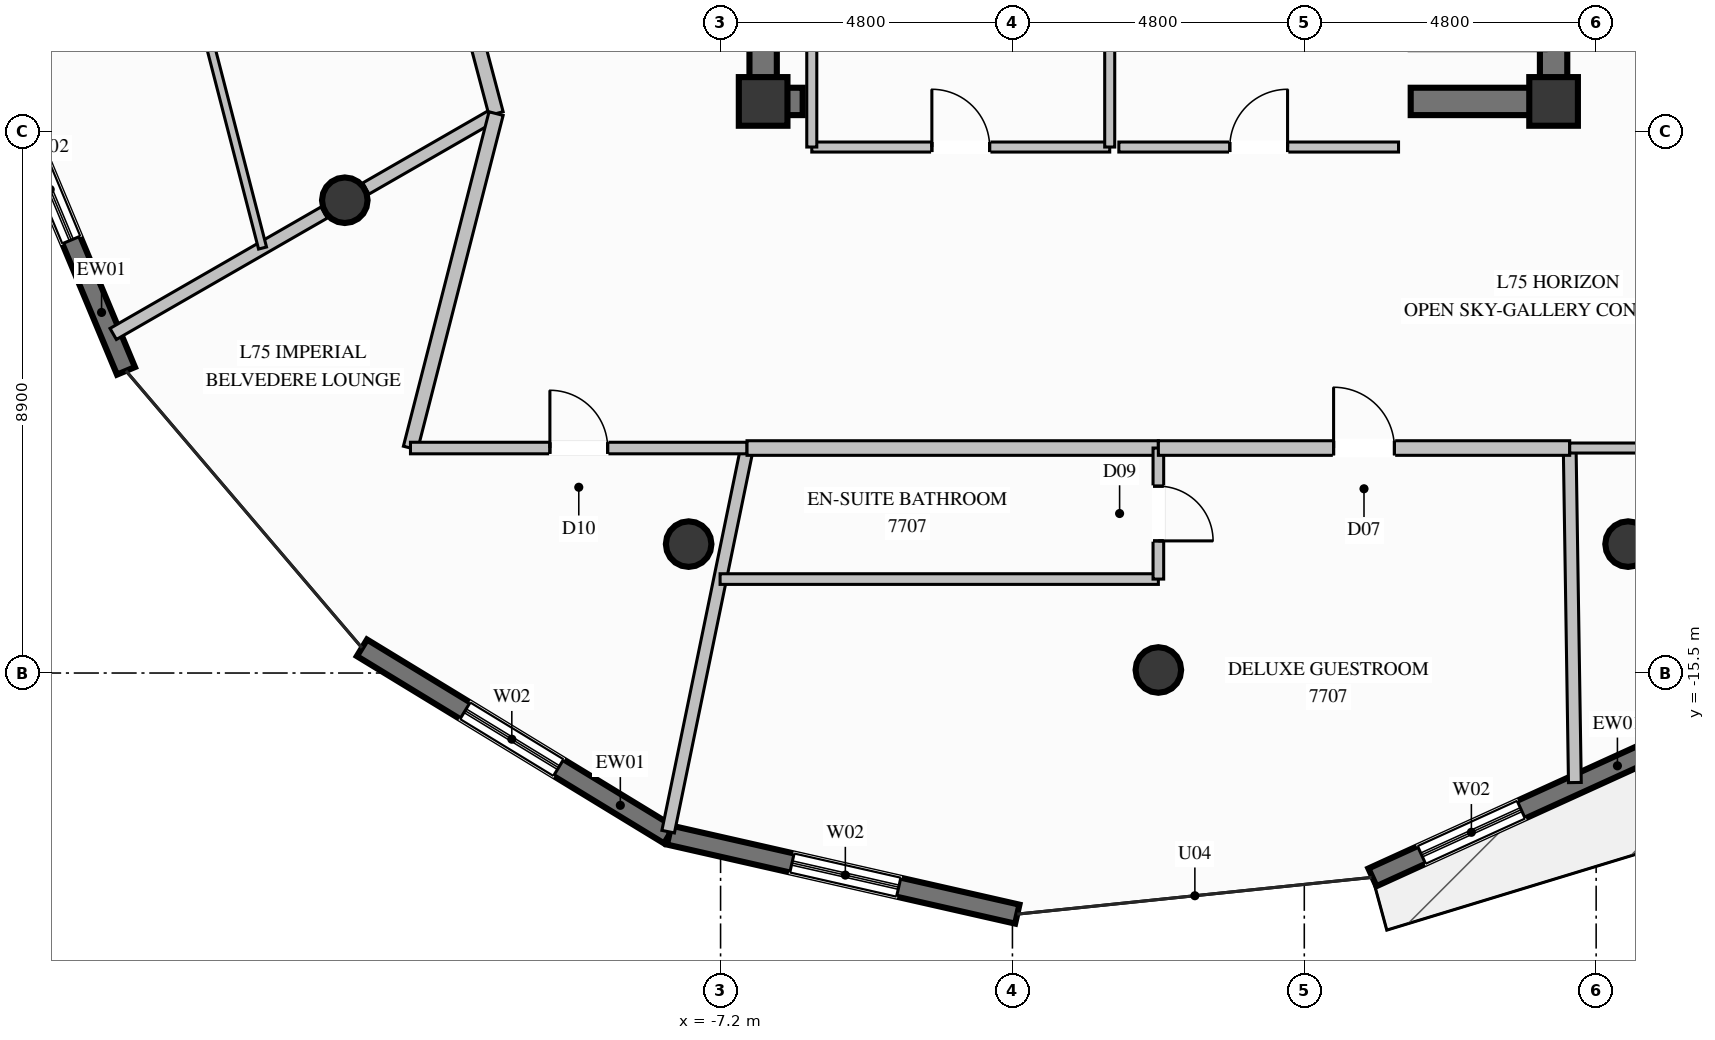
"""IFC4 building model, lengths in metres.
Left out: names, types, materials, properties, quantities, classifications, styles, units other than length and angle.
Written with IfcOpenShell. Run it as: python <this file> out.ifc"""

import sys

from ifc_helpers import new_model, si_unit, direction, frame, frame_2d, origin, origin_2d, place, context, subcontext, project, spatial, rectangle, circle, extrude, element, fill, save


model = new_model("IFC4")
c1 = context("Model", 3, precision=1e-05, world=origin(), true_north=direction((0.0, 1.0)))
c2 = subcontext(c1, "Body", "Model", "MODEL_VIEW")
j1 = project(units=[si_unit("LENGTHUNIT", "METRE"), si_unit("PLANEANGLEUNIT", "RADIAN")], contexts=[c1])
p1 = place(None, origin())
s1 = spatial("IfcSite", under=j1, at=p1, CompositionType="ELEMENT")
p2 = place(p1, origin())
s2 = spatial("IfcBuilding", under=s1, at=p2, CompositionType="ELEMENT")
p3 = place(p2, frame((0.0, 0.0, 289.6)))
s3 = spatial("IfcBuildingStorey", under=s2, at=p3, CompositionType="ELEMENT", Elevation=289.6)
for number, where, z_axis, x_axis in (
    (1, (-6.5, -6.1, 0.0), (0.0, 0.0, 1.0), (1.0, 0.0, 0.0)),
    (2, (6.5, -6.1, 0.0), (0.0, 0.0, 1.0), (1.0, 0.0, 0.0)),
):
    element("IfcColumn", number, at=place(p3, frame(where, z_axis=z_axis, x_axis=x_axis)), inside=s3, PredefinedType="COLUMN", context=c2, shape_type="SweptSolid", body=[
        extrude(rectangle(XDim=0.8, YDim=0.8, at=origin_2d()), origin(), (0.0, 0.0, 1.0), 3.8),
    ])
p4 = place(p3, frame((-6.275, -6.1, 0.0), z_axis=(0.0, 0.0, 1.0), x_axis=(1.0, 0.0, 0.0)))
e3 = element("IfcWall", 3, at=p4, inside=s3, PredefinedType="SHEAR", context=c2, shape_type="SweptSolid", body=[
    extrude(rectangle(XDim=0.425, YDim=0.45, at=frame_2d((0.212, 0.0))), origin(), (0.0, 0.0, 1.0), 3.8),
])
p5 = place(p3, frame((4.15, -6.1, 0.0), z_axis=(0.0, 0.0, 1.0), x_axis=(1.0, 0.0, 0.0)))
e4 = element("IfcWall", 4, at=p5, inside=s3, PredefinedType="SHEAR", context=c2, shape_type="SweptSolid", body=[
    extrude(rectangle(XDim=2.125, YDim=0.45, at=frame_2d((1.062, 0.0))), origin(), (0.0, 0.0, 1.0), 3.8),
])
p6 = place(p3, frame((-6.5, -6.325, 0.0), z_axis=(0.0, 0.0, 1.0), x_axis=(0.0, 1.0, 0.0)))
e5 = element("IfcWall", 5, at=p6, inside=s3, PredefinedType="SHEAR", context=c2, shape_type="SweptSolid", body=[
    extrude(rectangle(XDim=2.975, YDim=0.45, at=frame_2d((1.487, 0.0))), origin(), (0.0, 0.0, 1.0), 3.8),
])
p7 = place(p3, frame((6.5, -6.325, 0.0), z_axis=(0.0, 0.0, 1.0), x_axis=(0.0, 1.0, 0.0)))
e6 = element("IfcWall", 6, at=p7, inside=s3, PredefinedType="SHEAR", context=c2, shape_type="SweptSolid", body=[
    extrude(rectangle(XDim=3.975, YDim=0.45, at=frame_2d((1.987, 0.0))), origin(), (0.0, 0.0, 1.0), 3.8),
])
for number, where, z_axis, x_axis in (
    (7, (-13.38, -7.725, 0.0), (0.0, 0.0, 1.0), (1.0, 0.0, 0.0)),
    (8, (-7.725, -13.38, 0.0), (0.0, 0.0, 1.0), (1.0, 0.0, 0.0)),
    (9, (0.0, -15.45, 0.0), (0.0, 0.0, 1.0), (1.0, 0.0, 0.0)),
    (10, (7.725, -13.38, 0.0), (0.0, 0.0, 1.0), (1.0, 0.0, 0.0)),
):
    element("IfcColumn", number, at=place(p3, frame(where, z_axis=z_axis, x_axis=x_axis)), inside=s3, PredefinedType="COLUMN", context=c2, shape_type="SweptSolid", body=[
        extrude(circle(Radius=0.375, at=origin_2d()), origin(), (0.0, 0.0, 1.0), 3.8),
    ])
p8 = place(p3, frame((8.905, -16.409, 0.0), z_axis=(0.0, 0.0, 1.0), x_axis=(-0.910118979779, -0.414347007526, 0.0)))
e11 = element("IfcWall", 11, at=p8, inside=s3, PredefinedType="SOLIDWALL", context=c2, shape_type="SweptSolid", body=[
    extrude(rectangle(XDim=5.916, YDim=0.32, at=frame_2d((2.958, 0.0))), origin(), (0.0, 0.0, 1.0), 3.57),
])
p9 = place(p8, frame((3.228, 0.0, 0.35)))
e12 = element("IfcOpeningElement", 12, at=p9, cuts=e11, PredefinedType="OPENING", context=c2, shape_type="SweptSolid", body=[
    extrude(rectangle(XDim=1.8, YDim=2.6, at=frame_2d((0.9, 1.3))), frame((0.0, 0.17, 0.0), z_axis=(0.0, -1.0, 0.0), x_axis=(1.0, 0.0, 0.0)), (0.0, 0.0, 1.0), 0.34),
])
p10 = place(p3, frame((-16.979, -10.531, 0.0), z_axis=(0.0, 0.0, 1.0), x_axis=(-0.385394166941, 0.922752044749, 0.0)))
e13 = element("IfcWall", 13, at=p10, inside=s3, PredefinedType="SOLIDWALL", context=c2, shape_type="SweptSolid", body=[
    extrude(rectangle(XDim=6.053, YDim=0.32, at=frame_2d((3.027, 0.0))), origin(), (0.0, 0.0, 1.0), 3.57),
])
p11 = place(p10, frame((2.333, 0.0, 0.35)))
e14 = element("IfcOpeningElement", 14, at=p11, cuts=e13, PredefinedType="OPENING", context=c2, shape_type="SweptSolid", body=[
    extrude(rectangle(XDim=1.8, YDim=2.6, at=frame_2d((0.9, 1.3))), frame((0.0, 0.17, 0.0), z_axis=(0.0, -1.0, 0.0), x_axis=(1.0, 0.0, 0.0)), (0.0, 0.0, 1.0), 0.34),
])
p12 = place(p3, frame((-8.046, -18.165, 0.0), z_axis=(0.0, 0.0, 1.0), x_axis=(-0.853900395315, 0.520436465748, 0.0)))
e15 = element("IfcWall", 15, at=p12, inside=s3, PredefinedType="SOLIDWALL", context=c2, shape_type="SweptSolid", body=[
    extrude(rectangle(XDim=5.917, YDim=0.32, at=frame_2d((2.958, 0.0))), origin(), (0.0, 0.0, 1.0), 3.57),
])
p13 = place(p12, frame((2.13, 0.0, 0.35)))
e16 = element("IfcOpeningElement", 16, at=p13, cuts=e15, PredefinedType="OPENING", context=c2, shape_type="SweptSolid", body=[
    extrude(rectangle(XDim=1.8, YDim=2.6, at=frame_2d((0.9, 1.3))), frame((0.0, 0.17, 0.0), z_axis=(0.0, -1.0, 0.0), x_axis=(1.0, 0.0, 0.0)), (0.0, 0.0, 1.0), 0.34),
])
p14 = place(p3, frame((-2.32, -19.465, 0.0), z_axis=(0.0, 0.0, 1.0), x_axis=(-0.975179805598, 0.221414423093, 0.0)))
e17 = element("IfcWall", 17, at=p14, inside=s3, PredefinedType="SOLIDWALL", context=c2, shape_type="SweptSolid", body=[
    extrude(rectangle(XDim=5.872, YDim=0.32, at=frame_2d((2.936, 0.0))), origin(), (0.0, 0.0, 1.0), 3.57),
])
p15 = place(p14, frame((2.0, 0.0, 0.35)))
e18 = element("IfcOpeningElement", 18, at=p15, cuts=e17, PredefinedType="OPENING", context=c2, shape_type="SweptSolid", body=[
    extrude(rectangle(XDim=1.8, YDim=2.6, at=frame_2d((0.9, 1.3))), frame((0.0, 0.17, 0.0), z_axis=(0.0, -1.0, 0.0), x_axis=(1.0, 0.0, 0.0)), (0.0, 0.0, 1.0), 0.34),
])
p16 = place(p3, frame((-5.7, -6.85, 0.0), z_axis=(0.0, 0.0, 1.0), x_axis=(1.0, 0.0, 0.0)))
e19 = element("IfcWall", 19, at=p16, inside=s3, PredefinedType="PARTITIONING", context=c2, shape_type="SweptSolid", body=[
    extrude(rectangle(XDim=4.9, YDim=0.165, at=frame_2d((2.45, 0.0))), origin(), (0.0, 0.0, 1.0), 2.655),
])
p17 = place(p16, frame((1.975, 0.0, 0.0)))
e20 = element("IfcOpeningElement", 20, at=p17, cuts=e19, PredefinedType="OPENING", context=c2, shape_type="SweptSolid", body=[
    extrude(rectangle(XDim=0.95, YDim=2.1, at=frame_2d((0.475, 1.05))), frame((0.0, 0.093, 0.0), z_axis=(0.0, -1.0, 0.0), x_axis=(1.0, 0.0, 0.0)), (0.0, 0.0, 1.0), 0.185),
])
p18 = place(p3, frame((-0.8, -6.85, 0.0), z_axis=(0.0, 0.0, 1.0), x_axis=(0.0, 1.0, 0.0)))
e21 = element("IfcWall", 21, at=p18, inside=s3, PredefinedType="PARTITIONING", context=c2, shape_type="SweptSolid", body=[
    extrude(rectangle(XDim=3.35, YDim=0.165, at=frame_2d((1.675, 0.0))), origin(), (0.0, 0.0, 1.0), 3.57),
])
p19 = place(p3, frame((-5.7, -3.5, 0.0), z_axis=(0.0, 0.0, 1.0), x_axis=(0.0, -1.0, 0.0)))
e22 = element("IfcWall", 22, at=p19, inside=s3, PredefinedType="PARTITIONING", context=c2, shape_type="SweptSolid", body=[
    extrude(rectangle(XDim=3.35, YDim=0.165, at=frame_2d((1.675, 0.0))), origin(), (0.0, 0.0, 1.0), 2.655),
])
p20 = place(p3, frame((-0.65, -6.85, 0.0), z_axis=(0.0, 0.0, 1.0), x_axis=(1.0, 0.0, 0.0)))
e23 = element("IfcWall", 23, at=p20, inside=s3, PredefinedType="PARTITIONING", context=c2, shape_type="SweptSolid", body=[
    extrude(rectangle(XDim=4.6, YDim=0.165, at=frame_2d((2.3, 0.0))), origin(), (0.0, 0.0, 1.0), 2.655),
])
p21 = place(p20, frame((1.825, 0.0, 0.0)))
e24 = element("IfcOpeningElement", 24, at=p21, cuts=e23, PredefinedType="OPENING", context=c2, shape_type="SweptSolid", body=[
    extrude(rectangle(XDim=0.95, YDim=2.1, at=frame_2d((0.475, 1.05))), frame((0.0, 0.093, 0.0), z_axis=(0.0, -1.0, 0.0), x_axis=(1.0, 0.0, 0.0)), (0.0, 0.0, 1.0), 0.185),
])
p22 = place(p3, frame((-10.892, -6.3, 0.0), z_axis=(0.0, 0.0, 1.0), x_axis=(-0.866768644494, -0.498710453993, 0.0)))
e25 = element("IfcWall", 25, at=p22, inside=s3, PredefinedType="PARTITIONING", context=c2, shape_type="SweptSolid", body=[
    extrude(rectangle(XDim=2.472, YDim=0.21, at=frame_2d((1.236, 0.0))), origin(), (0.0, 0.0, 1.0), 3.085),
])
p23 = place(p3, frame((-13.719, -7.927, 0.0), z_axis=(0.0, 0.0, 1.0), x_axis=(-0.866707942238, -0.498815940865, 0.0)))
e26 = element("IfcWall", 26, at=p23, inside=s3, PredefinedType="PARTITIONING", context=c2, shape_type="SweptSolid", body=[
    extrude(rectangle(XDim=4.004, YDim=0.21, at=frame_2d((2.002, 0.0))), origin(), (0.0, 0.0, 1.0), 3.57),
])
p24 = place(p3, frame((-12.6, 0.15, 0.0), z_axis=(0.0, 0.0, 1.0), x_axis=(0.255986090798, -0.966680464951, 0.0)))
e27 = element("IfcWall", 27, at=p24, inside=s3, PredefinedType="PARTITIONING", context=c2, shape_type="SweptSolid", body=[
    extrude(rectangle(XDim=6.672, YDim=0.24, at=frame_2d((3.336, 0.0))), origin(), (0.0, 0.0, 1.0), 3.57),
])
p25 = place(p3, frame((-16.945, 0.058, 0.0), z_axis=(0.0, 0.0, 1.0), x_axis=(0.249960615912, -0.968256004625, 0.0)))
e28 = element("IfcWall", 28, at=p25, inside=s3, PredefinedType="PARTITIONING", context=c2, shape_type="SweptSolid", body=[
    extrude(rectangle(XDim=8.85, YDim=0.135, at=frame_2d((4.425, 0.0))), origin(), (0.0, 0.0, 1.0), 3.57),
])
p26 = place(p25, frame((3.95, 0.0, 0.0)))
e29 = element("IfcOpeningElement", 29, at=p26, cuts=e28, PredefinedType="OPENING", context=c2, shape_type="SweptSolid", body=[
    extrude(rectangle(XDim=0.95, YDim=2.1, at=frame_2d((0.475, 1.05))), frame((0.0, 0.078, 0.0), z_axis=(0.0, -1.0, 0.0), x_axis=(1.0, 0.0, 0.0)), (0.0, 0.0, 1.0), 0.155),
])
p27 = place(p3, frame((-6.765, -11.8, 0.0), z_axis=(0.0, 0.0, 1.0), x_axis=(-0.201390879279, -0.979510956418, 0.0)))
e30 = element("IfcWall", 30, at=p27, inside=s3, PredefinedType="PARTITIONING", context=c2, shape_type="SweptSolid", body=[
    extrude(rectangle(XDim=6.441, YDim=0.21, at=frame_2d((3.22, 0.0))), origin(), (0.0, 0.0, 1.0), 3.085),
])
p28 = place(p3, frame((-10.892, -6.3, 0.0), z_axis=(0.0, 0.0, 1.0), x_axis=(-0.247995630193, -0.968761150855, 0.0)))
e31 = element("IfcWall", 31, at=p28, inside=s3, PredefinedType="PARTITIONING", context=c2, shape_type="SweptSolid", body=[
    extrude(rectangle(XDim=5.677, YDim=0.24, at=frame_2d((2.839, 0.0))), origin(), (0.0, 0.0, 1.0), 3.57),
])
p29 = place(p3, frame((-12.3, -11.8, 0.0), z_axis=(0.0, 0.0, 1.0), x_axis=(1.0, 0.0, 0.0)))
e32 = element("IfcWall", 32, at=p29, inside=s3, PredefinedType="PARTITIONING", context=c2, shape_type="SweptSolid", body=[
    extrude(rectangle(XDim=5.535, YDim=0.19, at=frame_2d((2.768, 0.0))), origin(), (0.0, 0.0, 1.0), 3.57),
])
p30 = place(p29, frame((2.293, 0.0, 0.0)))
e33 = element("IfcOpeningElement", 33, at=p30, cuts=e32, PredefinedType="OPENING", context=c2, shape_type="SweptSolid", body=[
    extrude(rectangle(XDim=0.95, YDim=2.1, at=frame_2d((0.475, 1.05))), frame((0.0, 0.105, 0.0), z_axis=(0.0, -1.0, 0.0), x_axis=(1.0, 0.0, 0.0)), (0.0, 0.0, 1.0), 0.21),
])
p31 = place(p3, frame((-6.765, -11.8, 0.0), z_axis=(0.0, 0.0, 1.0), x_axis=(1.0, 0.0, 0.0)))
e34 = element("IfcWall", 34, at=p31, inside=s3, PredefinedType="PARTITIONING", context=c2, shape_type="SweptSolid", body=[
    extrude(rectangle(XDim=6.765, YDim=0.24, at=frame_2d((3.382, 0.0))), origin(), (0.0, 0.0, 1.0), 3.57),
])
p32 = place(p3, frame((-7.208, -13.955, 0.0), z_axis=(0.0, 0.0, 1.0), x_axis=(1.0, 0.0, 0.0)))
e35 = element("IfcWall", 35, at=p32, inside=s3, PredefinedType="PLUMBINGWALL", context=c2, shape_type="SweptSolid", body=[
    extrude(rectangle(XDim=7.208, YDim=0.175, at=frame_2d((3.604, 0.0))), origin(), (0.0, 0.0, 1.0), 3.138),
])
p33 = place(p3, frame((0.0, -11.8, 0.0), z_axis=(0.0, 0.0, 1.0), x_axis=(0.0, -1.0, 0.0)))
e36 = element("IfcWall", 36, at=p33, inside=s3, PredefinedType="PLUMBINGWALL", context=c2, shape_type="SweptSolid", body=[
    extrude(rectangle(XDim=2.155, YDim=0.175, at=frame_2d((1.078, 0.0))), origin(), (0.0, 0.0, 1.0), 3.57),
])
p34 = place(p33, frame((0.627, 0.0, 0.0)))
e37 = element("IfcOpeningElement", 37, at=p34, cuts=e36, PredefinedType="OPENING", context=c2, shape_type="SweptSolid", body=[
    extrude(rectangle(XDim=0.9, YDim=2.1, at=frame_2d((0.45, 1.05))), frame((0.0, 0.098, 0.0), z_axis=(0.0, -1.0, 0.0), x_axis=(1.0, 0.0, 0.0)), (0.0, 0.0, 1.0), 0.195),
])
p35 = place(p3, frame((6.765, -11.8, 0.0), z_axis=(0.0, 0.0, 1.0), x_axis=(0.015487224523, -0.999880065746, 0.0)))
e38 = element("IfcWall", 38, at=p35, inside=s3, PredefinedType="PARTITIONING", context=c2, shape_type="SweptSolid", body=[
    extrude(rectangle(XDim=5.502, YDim=0.21, at=frame_2d((2.751, 0.0))), origin(), (0.0, 0.0, 1.0), 3.57),
])
p36 = place(p3, frame((0.0, -11.8, 0.0), z_axis=(0.0, 0.0, 1.0), x_axis=(1.0, 0.0, 0.0)))
e39 = element("IfcWall", 39, at=p36, inside=s3, PredefinedType="PARTITIONING", context=c2, shape_type="SweptSolid", body=[
    extrude(rectangle(XDim=6.765, YDim=0.24, at=frame_2d((3.382, 0.0))), origin(), (0.0, 0.0, 1.0), 3.57),
])
p37 = place(p36, frame((2.882, 0.0, 0.0)))
e40 = element("IfcOpeningElement", 40, at=p37, cuts=e39, PredefinedType="OPENING", context=c2, shape_type="SweptSolid", body=[
    extrude(rectangle(XDim=1.0, YDim=2.2, at=frame_2d((0.5, 1.1))), frame((0.0, 0.13, 0.0), z_axis=(0.0, -1.0, 0.0), x_axis=(1.0, 0.0, 0.0)), (0.0, 0.0, 1.0), 0.26),
])
p38 = place(p3, frame((6.765, -11.8, 0.0), z_axis=(0.0, 0.0, 1.0), x_axis=(1.0, 0.0, 0.0)))
e41 = element("IfcWall", 41, at=p38, inside=s3, PredefinedType="PARTITIONING", context=c2, shape_type="SweptSolid", body=[
    extrude(rectangle(XDim=5.535, YDim=0.165, at=frame_2d((2.768, 0.0))), origin(), (0.0, 0.0, 1.0), 3.57),
])
p39 = place(p38, frame((2.293, 0.0, 0.0)))
e42 = element("IfcOpeningElement", 42, at=p39, cuts=e41, PredefinedType="OPENING", context=c2, shape_type="SweptSolid", body=[
    extrude(rectangle(XDim=0.95, YDim=2.1, at=frame_2d((0.475, 1.05))), frame((0.0, 0.093, 0.0), z_axis=(0.0, -1.0, 0.0), x_axis=(1.0, 0.0, 0.0)), (0.0, 0.0, 1.0), 0.185),
])
p40 = place(p9, origin())
e43 = element("IfcWindow", 43, at=p40, inside=s3, PartitioningType="SINGLE_PANEL", PredefinedType="WINDOW", context=c2, shape_type="SweptSolid", body=[
    extrude(rectangle(XDim=1.8, YDim=2.6, at=frame_2d((0.9, 1.3))), frame((0.0, 0.03, 0.0), z_axis=(0.0, -1.0, 0.0), x_axis=(1.0, 0.0, 0.0)), (0.0, 0.0, 1.0), 0.06),
])
fill(e12, e43)
p41 = place(p11, origin())
e44 = element("IfcWindow", 44, at=p41, inside=s3, PartitioningType="SINGLE_PANEL", PredefinedType="WINDOW", context=c2, shape_type="SweptSolid", body=[
    extrude(rectangle(XDim=1.8, YDim=2.6, at=frame_2d((0.9, 1.3))), frame((0.0, 0.03, 0.0), z_axis=(0.0, -1.0, 0.0), x_axis=(1.0, 0.0, 0.0)), (0.0, 0.0, 1.0), 0.06),
])
fill(e14, e44)
p42 = place(p13, origin())
e45 = element("IfcWindow", 45, at=p42, inside=s3, PartitioningType="SINGLE_PANEL", PredefinedType="WINDOW", context=c2, shape_type="SweptSolid", body=[
    extrude(rectangle(XDim=1.8, YDim=2.6, at=frame_2d((0.9, 1.3))), frame((0.0, 0.03, 0.0), z_axis=(0.0, -1.0, 0.0), x_axis=(1.0, 0.0, 0.0)), (0.0, 0.0, 1.0), 0.06),
])
fill(e16, e45)
p43 = place(p15, origin())
e46 = element("IfcWindow", 46, at=p43, inside=s3, PartitioningType="SINGLE_PANEL", PredefinedType="WINDOW", context=c2, shape_type="SweptSolid", body=[
    extrude(rectangle(XDim=1.8, YDim=2.6, at=frame_2d((0.9, 1.3))), frame((0.0, 0.03, 0.0), z_axis=(0.0, -1.0, 0.0), x_axis=(1.0, 0.0, 0.0)), (0.0, 0.0, 1.0), 0.06),
])
fill(e18, e46)
p44 = place(p17, origin())
e47 = element("IfcDoor", 47, at=p44, inside=s3, OperationType="SINGLE_SWING_LEFT", PredefinedType="DOOR", context=c2, shape_type="SweptSolid", body=[
    extrude(rectangle(XDim=0.95, YDim=2.1, at=frame_2d((0.475, 1.05))), frame((0.0, 0.025, 0.0), z_axis=(0.0, -1.0, 0.0), x_axis=(1.0, 0.0, 0.0)), (0.0, 0.0, 1.0), 0.05),
])
fill(e20, e47)
p45 = place(p21, origin())
e48 = element("IfcDoor", 48, at=p45, inside=s3, OperationType="SINGLE_SWING_RIGHT", PredefinedType="DOOR", context=c2, shape_type="SweptSolid", body=[
    extrude(rectangle(XDim=0.95, YDim=2.1, at=frame_2d((0.475, 1.05))), frame((0.0, 0.025, 0.0), z_axis=(0.0, -1.0, 0.0), x_axis=(1.0, 0.0, 0.0)), (0.0, 0.0, 1.0), 0.05),
])
fill(e24, e48)
p46 = place(p30, origin())
e49 = element("IfcDoor", 49, at=p46, inside=s3, OperationType="SINGLE_SWING_LEFT", PredefinedType="DOOR", context=c2, shape_type="SweptSolid", body=[
    extrude(rectangle(XDim=0.95, YDim=2.1, at=frame_2d((0.475, 1.05))), frame((0.0, 0.025, 0.0), z_axis=(0.0, -1.0, 0.0), x_axis=(1.0, 0.0, 0.0)), (0.0, 0.0, 1.0), 0.05),
])
fill(e33, e49)
p47 = place(p34, origin())
e50 = element("IfcDoor", 50, at=p47, inside=s3, OperationType="SINGLE_SWING_RIGHT", PredefinedType="DOOR", context=c2, shape_type="SweptSolid", body=[
    extrude(rectangle(XDim=0.9, YDim=2.1, at=frame_2d((0.45, 1.05))), frame((0.0, 0.025, 0.0), z_axis=(0.0, -1.0, 0.0), x_axis=(1.0, 0.0, 0.0)), (0.0, 0.0, 1.0), 0.05),
])
fill(e37, e50)
p48 = place(p37, origin())
e51 = element("IfcDoor", 51, at=p48, inside=s3, OperationType="SINGLE_SWING_LEFT", PredefinedType="DOOR", context=c2, shape_type="SweptSolid", body=[
    extrude(rectangle(XDim=1.0, YDim=2.2, at=frame_2d((0.5, 1.1))), frame((0.0, 0.025, 0.0), z_axis=(0.0, -1.0, 0.0), x_axis=(1.0, 0.0, 0.0)), (0.0, 0.0, 1.0), 0.05),
])
fill(e40, e51)
save(model, sys.argv[1])
